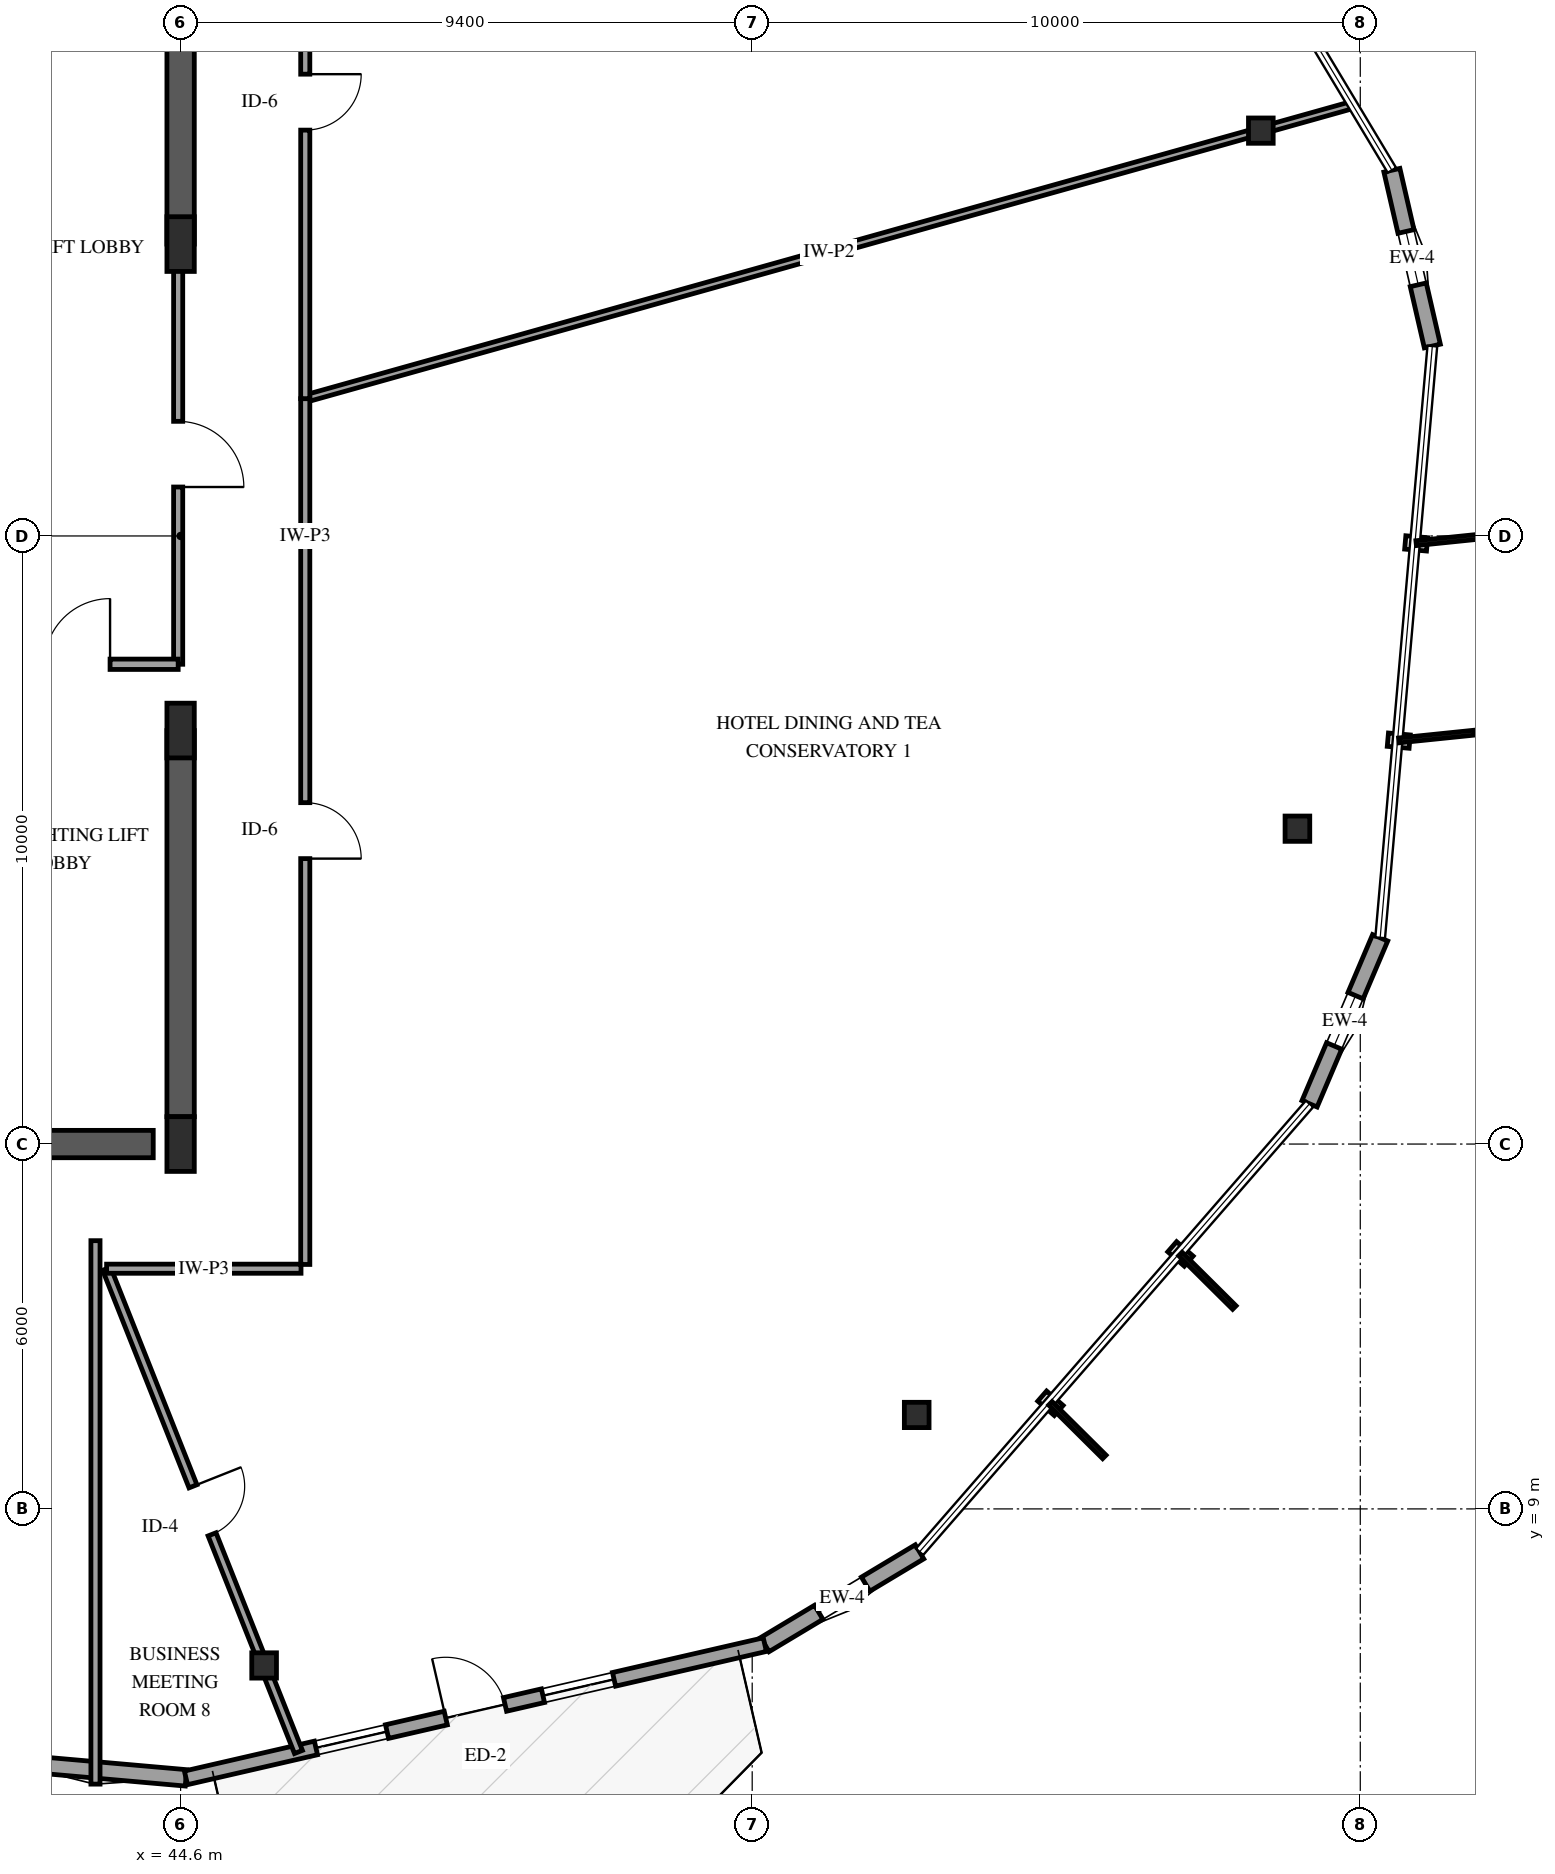
"""IFC4 building model, lengths in metres.
Left out: names, types, materials, properties, quantities, classifications, styles, units other than length and angle.
Written with IfcOpenShell. Run it as: python <this file> out.ifc"""

import sys

from ifc_helpers import new_model, si_unit, direction, frame, frame_2d, origin, origin_2d, place, context, subcontext, project, spatial, rectangle, i_section, extrude, element, fill, save


model = new_model("IFC4")
c1 = context("Model", 3, precision=1e-05, world=origin(), true_north=direction((0.0, 1.0)))
c2 = subcontext(c1, "Body", "Model", "MODEL_VIEW")
j1 = project(units=[si_unit("LENGTHUNIT", "METRE"), si_unit("PLANEANGLEUNIT", "RADIAN")], contexts=[c1])
p1 = place(None, origin())
s1 = spatial("IfcSite", under=j1, at=p1, CompositionType="ELEMENT")
p2 = place(p1, origin())
s2 = spatial("IfcBuilding", under=s1, at=p2, CompositionType="ELEMENT")
p3 = place(p2, frame((0.0, 0.0, 212.2)))
s3 = spatial("IfcBuildingStorey", under=s2, at=p3, CompositionType="ELEMENT", Elevation=212.2)
p4 = place(p3, frame((41.3, 15.0, 0.0), z_axis=(0.0, 0.0, 1.0), x_axis=(1.0, 0.0, 0.0)))
e1 = element("IfcWall", 1, at=p4, inside=s3, PredefinedType="SHEAR", context=c2, shape_type="SweptSolid", body=[
    extrude(rectangle(XDim=2.85, YDim=0.45, at=frame_2d((1.425, 0.0))), origin(), (0.0, 0.0, 1.0), 3.6),
])
p5 = place(p3, frame((44.6, 15.45, 0.0), z_axis=(0.0, 0.0, 1.0), x_axis=(0.0, 1.0, 0.0)))
e2 = element("IfcWall", 2, at=p5, inside=s3, PredefinedType="SHEAR", context=c2, shape_type="SweptSolid", body=[
    extrude(rectangle(XDim=6.35, YDim=0.45, at=frame_2d((3.175, 0.0))), origin(), (0.0, 0.0, 1.0), 3.6),
])
p6 = place(p3, frame((44.6, 29.8, 0.0), z_axis=(0.0, 0.0, 1.0), x_axis=(0.0, 1.0, 0.0)))
e3 = element("IfcWall", 3, at=p6, inside=s3, PredefinedType="SHEAR", context=c2, shape_type="SweptSolid", body=[
    extrude(rectangle(XDim=4.75, YDim=0.45, at=frame_2d((2.375, 0.0))), origin(), (0.0, 0.0, 1.0), 3.6),
])
for number, where, z_axis, x_axis in (
    (4, (44.6, 15.0, 0.0), (0.0, 0.0, 1.0), (1.0, 0.0, 0.0)),
    (5, (44.6, 21.8, 0.0), (0.0, 0.0, 1.0), (1.0, 0.0, 0.0)),
    (6, (44.6, 29.8, 0.0), (0.0, 0.0, 1.0), (1.0, 0.0, 0.0)),
):
    element("IfcColumn", number, at=place(p3, frame(where, z_axis=z_axis, x_axis=x_axis)), inside=s3, PredefinedType="PILASTER", context=c2, shape_type="SweptSolid", body=[
        extrude(rectangle(XDim=0.45, YDim=0.9, at=origin_2d()), origin(), (0.0, 0.0, 1.0), 3.6),
    ])
for number, where, z_axis, x_axis in (
    (7, (62.365, 31.666, 0.0), (0.0, 0.0, 1.0), (1.0, 0.0, 0.0)),
    (8, (45.973, 6.426, 0.0), (0.0, 0.0, 1.0), (1.0, 0.0, 0.0)),
    (9, (56.705, 10.545, 0.0), (0.0, 0.0, 1.0), (1.0, 0.0, 0.0)),
    (10, (62.966, 20.186, 0.0), (0.0, 0.0, 1.0), (1.0, 0.0, 0.0)),
):
    element("IfcColumn", number, at=place(p3, frame(where, z_axis=z_axis, x_axis=x_axis)), inside=s3, PredefinedType="COLUMN", context=c2, shape_type="SweptSolid", body=[
        extrude(i_section(OverallWidth=0.406, OverallDepth=0.416, WebThickness=0.03, FlangeThickness=0.048, FilletRadius=0.038, at=origin_2d()), origin(), (0.0, 0.0, 1.0), 3.6),
    ])
p7 = place(p3, frame((41.733, 4.838, 0.0), z_axis=(0.0, 0.0, 1.0), x_axis=(0.996129850025, -0.087893810296, 0.0)))
e11 = element("IfcWall", 11, at=p7, inside=s3, PredefinedType="SOLIDWALL", context=c2, shape_type="SweptSolid", body=[
    extrude(rectangle(XDim=2.967, YDim=0.27, at=frame_2d((1.483, 0.0))), origin(), (0.0, 0.0, 1.0), 2.679),
])
p8 = place(p3, frame((54.208, 6.768, 0.0), z_axis=(0.0, 0.0, 1.0), x_axis=(0.857507449303, 0.51447154867, 0.0)))
e12 = element("IfcWall", 12, at=p8, inside=s3, PredefinedType="SOLIDWALL", context=c2, shape_type="SweptSolid", body=[
    extrude(rectangle(XDim=2.966, YDim=0.27, at=frame_2d((1.483, 0.0))), origin(), (0.0, 0.0, 1.0), 2.679),
])
p9 = place(p8, frame((1.033, 0.0, 0.75)))
e13 = element("IfcOpeningElement", 13, at=p9, cuts=e12, PredefinedType="OPENING", context=c2, shape_type="SweptSolid", body=[
    extrude(rectangle(XDim=0.9, YDim=1.5, at=frame_2d((0.45, 0.75))), frame((0.0, 0.145, 0.0), z_axis=(0.0, -1.0, 0.0), x_axis=(1.0, 0.0, 0.0)), (0.0, 0.0, 1.0), 0.29),
])
p10 = place(p3, frame((44.688, 4.577, 0.0), z_axis=(0.0, 0.0, 1.0), x_axis=(0.974525807261, 0.224275390941, 0.0)))
e14 = element("IfcWall", 14, at=p10, inside=s3, PredefinedType="SOLIDWALL", context=c2, shape_type="SweptSolid", body=[
    extrude(rectangle(XDim=9.769, YDim=0.23, at=frame_2d((4.884, 0.0))), origin(), (0.0, 0.0, 1.0), 2.679),
])
p11 = place(p10, frame((4.385, 0.0, 0.0)))
e15 = element("IfcOpeningElement", 15, at=p11, cuts=e14, PredefinedType="OPENING", context=c2, shape_type="SweptSolid", body=[
    extrude(rectangle(XDim=1.0, YDim=2.15, at=frame_2d((0.5, 1.075))), frame((0.0, 0.125, 0.0), z_axis=(0.0, -1.0, 0.0), x_axis=(1.0, 0.0, 0.0)), (0.0, 0.0, 1.0), 0.25),
])
p12 = place(p10, frame((2.194, 0.0, 0.72)))
e16 = element("IfcOpeningElement", 16, at=p12, cuts=e14, PredefinedType="OPENING", context=c2, shape_type="SweptSolid", body=[
    extrude(rectangle(XDim=1.2, YDim=1.6, at=frame_2d((0.6, 0.8))), frame((0.0, 0.125, 0.0), z_axis=(0.0, -1.0, 0.0), x_axis=(1.0, 0.0, 0.0)), (0.0, 0.0, 1.0), 0.25),
])
p13 = place(p10, frame((6.024, 0.0, 0.72)))
e17 = element("IfcOpeningElement", 17, at=p13, cuts=e14, PredefinedType="OPENING", context=c2, shape_type="SweptSolid", body=[
    extrude(rectangle(XDim=1.2, YDim=1.6, at=frame_2d((0.6, 0.8))), frame((0.0, 0.125, 0.0), z_axis=(0.0, -1.0, 0.0), x_axis=(1.0, 0.0, 0.0)), (0.0, 0.0, 1.0), 0.25),
])
p14 = place(p3, frame((63.166, 15.662, 0.0), z_axis=(0.0, 0.0, 1.0), x_axis=(0.391325355633, 0.920252392574, 0.0)))
e18 = element("IfcWall", 18, at=p14, inside=s3, PredefinedType="SOLIDWALL", context=c2, shape_type="SweptSolid", body=[
    extrude(rectangle(XDim=2.967, YDim=0.27, at=frame_2d((1.483, 0.0))), origin(), (0.0, 0.0, 1.0), 2.679),
])
p15 = place(p14, frame((1.033, 0.0, 0.75)))
e19 = element("IfcOpeningElement", 19, at=p15, cuts=e18, PredefinedType="OPENING", context=c2, shape_type="SweptSolid", body=[
    extrude(rectangle(XDim=0.9, YDim=1.5, at=frame_2d((0.45, 0.75))), frame((0.0, 0.145, 0.0), z_axis=(0.0, -1.0, 0.0), x_axis=(1.0, 0.0, 0.0)), (0.0, 0.0, 1.0), 0.29),
])
p16 = place(p3, frame((65.185, 28.123, 0.0), z_axis=(0.0, 0.0, 1.0), x_axis=(-0.224270411894, 0.974526953116, 0.0)))
e20 = element("IfcWall", 20, at=p16, inside=s3, PredefinedType="SOLIDWALL", context=c2, shape_type="SweptSolid", body=[
    extrude(rectangle(XDim=2.967, YDim=0.27, at=frame_2d((1.483, 0.0))), origin(), (0.0, 0.0, 1.0), 2.679),
])
p17 = place(p16, frame((1.033, 0.0, 0.75)))
e21 = element("IfcOpeningElement", 21, at=p17, cuts=e20, PredefinedType="OPENING", context=c2, shape_type="SweptSolid", body=[
    extrude(rectangle(XDim=0.9, YDim=1.5, at=frame_2d((0.45, 0.75))), frame((0.0, 0.145, 0.0), z_axis=(0.0, -1.0, 0.0), x_axis=(1.0, 0.0, 0.0)), (0.0, 0.0, 1.0), 0.29),
])
p18 = place(p3, frame((63.875, 32.089, 0.0), z_axis=(0.0, 0.0, 1.0), x_axis=(-0.962847424489, -0.270045990813, 0.0)))
e22 = element("IfcWall", 22, at=p18, inside=s3, PredefinedType="PARTITIONING", context=c2, shape_type="SweptSolid", body=[
    extrude(rectangle(XDim=17.89, YDim=0.12, at=frame_2d((8.945, 0.0))), origin(), (0.0, 0.0, 1.0), 3.3),
])
p19 = place(p3, frame((46.65, 27.258, 0.0), z_axis=(0.0, 0.0, 1.0), x_axis=(0.0, -1.0, 0.0)))
e23 = element("IfcWall", 23, at=p19, inside=s3, PredefinedType="PARTITIONING", context=c2, shape_type="SweptSolid", body=[
    extrude(rectangle(XDim=14.238, YDim=0.15, at=frame_2d((7.119, 0.0))), origin(), (0.0, 0.0, 1.0), 3.3),
])
p20 = place(p19, frame((6.644, 0.0, 0.0)))
e24 = element("IfcOpeningElement", 24, at=p20, cuts=e23, PredefinedType="OPENING", context=c2, shape_type="SweptSolid", body=[
    extrude(rectangle(XDim=0.92, YDim=2.12, at=frame_2d((0.46, 1.06))), frame((0.0, 0.085, 0.0), z_axis=(0.0, -1.0, 0.0), x_axis=(1.0, 0.0, 0.0)), (0.0, 0.0, 1.0), 0.17),
])
p21 = place(p3, frame((46.65, 36.98, 0.0), z_axis=(0.0, 0.0, 1.0), x_axis=(0.0, -1.0, 0.0)))
e25 = element("IfcWall", 25, at=p21, inside=s3, PredefinedType="PARTITIONING", context=c2, shape_type="SweptSolid", body=[
    extrude(rectangle(XDim=9.722, YDim=0.15, at=frame_2d((4.861, 0.0))), origin(), (0.0, 0.0, 1.0), 3.3),
])
p22 = place(p21, frame((4.386, 0.0, 0.0)))
e26 = element("IfcOpeningElement", 26, at=p22, cuts=e25, PredefinedType="OPENING", context=c2, shape_type="SweptSolid", body=[
    extrude(rectangle(XDim=0.92, YDim=2.12, at=frame_2d((0.46, 1.06))), frame((0.0, 0.085, 0.0), z_axis=(0.0, -1.0, 0.0), x_axis=(1.0, 0.0, 0.0)), (0.0, 0.0, 1.0), 0.17),
])
p23 = place(p3, frame((43.383, 12.95, 0.0), z_axis=(0.0, 0.0, 1.0), x_axis=(0.368991960786, -0.929432586515, 0.0)))
e27 = element("IfcWall", 27, at=p23, inside=s3, PredefinedType="PARTITIONING", context=c2, shape_type="SweptSolid", body=[
    extrude(rectangle(XDim=8.55, YDim=0.14, at=frame_2d((4.275, 0.0))), origin(), (0.0, 0.0, 1.0), 2.595),
])
p24 = place(p23, frame((3.85, 0.0, 0.0)))
e28 = element("IfcOpeningElement", 28, at=p24, cuts=e27, PredefinedType="OPENING", context=c2, shape_type="SweptSolid", body=[
    extrude(rectangle(XDim=0.85, YDim=2.1, at=frame_2d((0.425, 1.05))), frame((0.0, 0.08, 0.0), z_axis=(0.0, -1.0, 0.0), x_axis=(1.0, 0.0, 0.0)), (0.0, 0.0, 1.0), 0.16),
])
p25 = place(p3, frame((44.56, 29.8, 0.0), z_axis=(0.0, 0.0, 1.0), x_axis=(0.0, -1.0, 0.0)))
e29 = element("IfcWall", 29, at=p25, inside=s3, PredefinedType="PARTITIONING", context=c2, shape_type="SweptSolid", body=[
    extrude(rectangle(XDim=6.91, YDim=0.15, at=frame_2d((3.455, 0.0))), origin(), (0.0, 0.0, 1.0), 2.34),
])
p26 = place(p25, frame((2.915, 0.0, 0.0)))
e30 = element("IfcOpeningElement", 30, at=p26, cuts=e29, PredefinedType="OPENING", context=c2, shape_type="SweptSolid", body=[
    extrude(rectangle(XDim=1.08, YDim=2.15, at=frame_2d((0.54, 1.075))), frame((0.0, 0.085, 0.0), z_axis=(0.0, -1.0, 0.0), x_axis=(1.0, 0.0, 0.0)), (0.0, 0.0, 1.0), 0.17),
])
p27 = place(p3, frame((41.24, 22.89, 0.0), z_axis=(0.0, 0.0, 1.0), x_axis=(1.0, 0.0, 0.0)))
e31 = element("IfcWall", 31, at=p27, inside=s3, PredefinedType="PARTITIONING", context=c2, shape_type="SweptSolid", body=[
    extrude(rectangle(XDim=3.32, YDim=0.17, at=frame_2d((1.66, 0.0))), origin(), (0.0, 0.0, 1.0), 3.3),
])
p28 = place(p27, frame((1.12, 0.0, 0.0)))
e32 = element("IfcOpeningElement", 32, at=p28, cuts=e31, PredefinedType="OPENING", context=c2, shape_type="SweptSolid", body=[
    extrude(rectangle(XDim=1.08, YDim=2.15, at=frame_2d((0.54, 1.075))), frame((0.0, 0.095, 0.0), z_axis=(0.0, -1.0, 0.0), x_axis=(1.0, 0.0, 0.0)), (0.0, 0.0, 1.0), 0.19),
])
p29 = place(p3, frame((46.58, 12.95, 0.0), z_axis=(0.0, 0.0, 1.0), x_axis=(-1.0, 0.0, 0.0)))
e33 = element("IfcWall", 33, at=p29, inside=s3, PredefinedType="PARTITIONING", context=c2, shape_type="SweptSolid", body=[
    extrude(rectangle(XDim=3.197, YDim=0.15, at=frame_2d((1.599, 0.0))), origin(), (0.0, 0.0, 1.0), 3.3),
])
p30 = place(p3, frame((43.2, 13.411, 0.0), z_axis=(0.0, 0.0, 1.0), x_axis=(0.0, -1.0, 0.0)))
e34 = element("IfcWall", 34, at=p30, inside=s3, PredefinedType="PARTITIONING", context=c2, shape_type="SweptSolid", body=[
    extrude(rectangle(XDim=8.937, YDim=0.15, at=frame_2d((4.468, 0.0))), origin(), (0.0, 0.0, 1.0), 3.3),
])
p31 = place(p9, origin())
e35 = element("IfcWindow", 35, at=p31, inside=s3, PartitioningType="SINGLE_PANEL", PredefinedType="WINDOW", context=c2, shape_type="SweptSolid", body=[
    extrude(rectangle(XDim=0.9, YDim=1.5, at=frame_2d((0.45, 0.75))), frame((0.0, 0.03, 0.0), z_axis=(0.0, -1.0, 0.0), x_axis=(1.0, 0.0, 0.0)), (0.0, 0.0, 1.0), 0.06),
])
fill(e13, e35)
p32 = place(p11, origin())
e36 = element("IfcDoor", 36, at=p32, inside=s3, OperationType="SINGLE_SWING_LEFT", PredefinedType="DOOR", context=c2, shape_type="SweptSolid", body=[
    extrude(rectangle(XDim=1.0, YDim=2.15, at=frame_2d((0.5, 1.075))), frame((0.0, 0.025, 0.0), z_axis=(0.0, -1.0, 0.0), x_axis=(1.0, 0.0, 0.0)), (0.0, 0.0, 1.0), 0.05),
])
fill(e15, e36)
p33 = place(p12, origin())
e37 = element("IfcWindow", 37, at=p33, inside=s3, PartitioningType="SINGLE_PANEL", PredefinedType="WINDOW", context=c2, shape_type="SweptSolid", body=[
    extrude(rectangle(XDim=1.2, YDim=1.6, at=frame_2d((0.6, 0.8))), frame((0.0, 0.03, 0.0), z_axis=(0.0, -1.0, 0.0), x_axis=(1.0, 0.0, 0.0)), (0.0, 0.0, 1.0), 0.06),
])
fill(e16, e37)
p34 = place(p13, origin())
e38 = element("IfcWindow", 38, at=p34, inside=s3, PartitioningType="SINGLE_PANEL", PredefinedType="WINDOW", context=c2, shape_type="SweptSolid", body=[
    extrude(rectangle(XDim=1.2, YDim=1.6, at=frame_2d((0.6, 0.8))), frame((0.0, 0.03, 0.0), z_axis=(0.0, -1.0, 0.0), x_axis=(1.0, 0.0, 0.0)), (0.0, 0.0, 1.0), 0.06),
])
fill(e17, e38)
p35 = place(p15, origin())
e39 = element("IfcWindow", 39, at=p35, inside=s3, PartitioningType="SINGLE_PANEL", PredefinedType="WINDOW", context=c2, shape_type="SweptSolid", body=[
    extrude(rectangle(XDim=0.9, YDim=1.5, at=frame_2d((0.45, 0.75))), frame((0.0, 0.03, 0.0), z_axis=(0.0, -1.0, 0.0), x_axis=(1.0, 0.0, 0.0)), (0.0, 0.0, 1.0), 0.06),
])
fill(e19, e39)
p36 = place(p17, origin())
e40 = element("IfcWindow", 40, at=p36, inside=s3, PartitioningType="SINGLE_PANEL", PredefinedType="WINDOW", context=c2, shape_type="SweptSolid", body=[
    extrude(rectangle(XDim=0.9, YDim=1.5, at=frame_2d((0.45, 0.75))), frame((0.0, 0.03, 0.0), z_axis=(0.0, -1.0, 0.0), x_axis=(1.0, 0.0, 0.0)), (0.0, 0.0, 1.0), 0.06),
])
fill(e21, e40)
p37 = place(p20, origin())
e41 = element("IfcDoor", 41, at=p37, inside=s3, OperationType="SINGLE_SWING_RIGHT", PredefinedType="DOOR", context=c2, shape_type="SweptSolid", body=[
    extrude(rectangle(XDim=0.92, YDim=2.12, at=frame_2d((0.46, 1.06))), frame((0.0, 0.025, 0.0), z_axis=(0.0, -1.0, 0.0), x_axis=(1.0, 0.0, 0.0)), (0.0, 0.0, 1.0), 0.05),
])
fill(e24, e41)
p38 = place(p22, origin())
e42 = element("IfcDoor", 42, at=p38, inside=s3, OperationType="SINGLE_SWING_LEFT", PredefinedType="DOOR", context=c2, shape_type="SweptSolid", body=[
    extrude(rectangle(XDim=0.92, YDim=2.12, at=frame_2d((0.46, 1.06))), frame((0.0, 0.025, 0.0), z_axis=(0.0, -1.0, 0.0), x_axis=(1.0, 0.0, 0.0)), (0.0, 0.0, 1.0), 0.05),
])
fill(e26, e42)
p39 = place(p24, origin())
e43 = element("IfcDoor", 43, at=p39, inside=s3, OperationType="SINGLE_SWING_LEFT", PredefinedType="DOOR", context=c2, shape_type="SweptSolid", body=[
    extrude(rectangle(XDim=0.85, YDim=2.1, at=frame_2d((0.425, 1.05))), frame((0.0, 0.025, 0.0), z_axis=(0.0, -1.0, 0.0), x_axis=(1.0, 0.0, 0.0)), (0.0, 0.0, 1.0), 0.05),
])
fill(e28, e43)
p40 = place(p26, origin())
e44 = element("IfcDoor", 44, at=p40, inside=s3, OperationType="SINGLE_SWING_RIGHT", PredefinedType="DOOR", context=c2, shape_type="SweptSolid", body=[
    extrude(rectangle(XDim=1.08, YDim=2.15, at=frame_2d((0.54, 1.075))), frame((0.0, 0.025, 0.0), z_axis=(0.0, -1.0, 0.0), x_axis=(1.0, 0.0, 0.0)), (0.0, 0.0, 1.0), 0.05),
])
fill(e30, e44)
p41 = place(p28, origin())
e45 = element("IfcDoor", 45, at=p41, inside=s3, OperationType="SINGLE_SWING_RIGHT", PredefinedType="DOOR", context=c2, shape_type="SweptSolid", body=[
    extrude(rectangle(XDim=1.08, YDim=2.15, at=frame_2d((0.54, 1.075))), frame((0.0, 0.025, 0.0), z_axis=(0.0, -1.0, 0.0), x_axis=(1.0, 0.0, 0.0)), (0.0, 0.0, 1.0), 0.05),
])
fill(e32, e45)
save(model, sys.argv[1])
